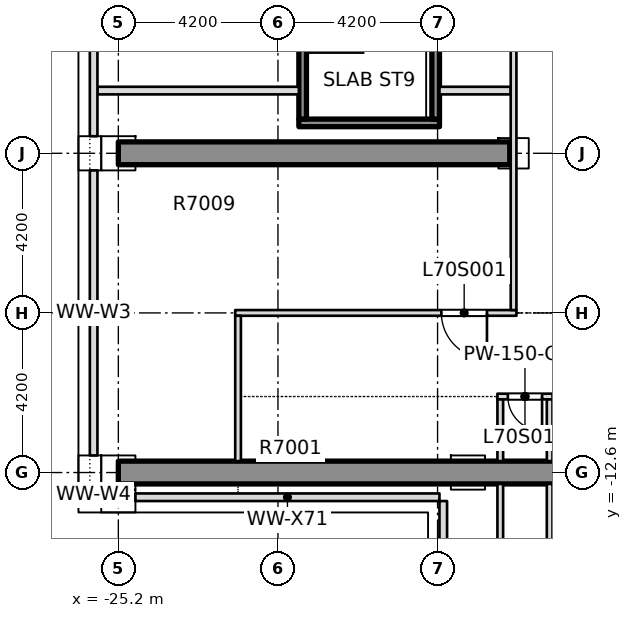
"""IFC4 building model, lengths in metres.
Left out: names, types, materials, properties, quantities, classifications, styles, units other than length and angle.
Written with IfcOpenShell. Run it as: python <this file> out.ifc"""

import sys

from ifc_helpers import new_model, si_unit, direction, frame, frame_2d, origin, place, context, subcontext, project, spatial, rectangle, extrude, element, fill, save


model = new_model("IFC4")
c1 = context("Model", 3, precision=1e-05, world=origin(), true_north=direction((0.0, 1.0)))
c2 = subcontext(c1, "Body", "Model", "MODEL_VIEW")
j1 = project(units=[si_unit("LENGTHUNIT", "METRE"), si_unit("PLANEANGLEUNIT", "RADIAN")], contexts=[c1])
p1 = place(None, origin())
s1 = spatial("IfcSite", under=j1, at=p1, CompositionType="ELEMENT")
p2 = place(p1, origin())
s2 = spatial("IfcBuilding", under=s1, at=p2, CompositionType="ELEMENT")
p3 = place(p2, frame((0.0, 0.0, 264.85)))
s3 = spatial("IfcBuildingStorey", under=s2, at=p3, CompositionType="ELEMENT", Elevation=264.85)
p4 = place(p3, frame((-8.55, -12.6, 0.0), z_axis=(0.0, 0.0, 1.0), x_axis=(-1.0, 0.0, 0.0)))
e1 = element("IfcWall", 1, at=p4, inside=s3, PredefinedType="SHEAR", context=c2, shape_type="SweptSolid", body=[
    extrude(rectangle(XDim=16.65, YDim=0.6, at=frame_2d((8.325, 0.0))), origin(), (0.0, 0.0, 1.0), 4.0),
])
p5 = place(p3, frame((-14.9, -4.2, 0.0), z_axis=(0.0, 0.0, 1.0), x_axis=(-1.0, 0.0, 0.0)))
e2 = element("IfcWall", 2, at=p5, inside=s3, PredefinedType="SHEAR", context=c2, shape_type="SweptSolid", body=[
    extrude(rectangle(XDim=10.3, YDim=0.6, at=frame_2d((5.15, 0.0))), origin(), (0.0, 0.0, 1.0), 4.0),
])
p6 = place(p3, frame((-15.225, -10.6, 0.0), z_axis=(0.0, 0.0, 1.0), x_axis=(1.0, 0.0, 0.0)))
e3 = element("IfcWall", 3, at=p6, inside=s3, PredefinedType="PARTITIONING", context=c2, shape_type="SweptSolid", body=[
    extrude(rectangle(XDim=1.45, YDim=0.15, at=frame_2d((0.725, 0.0))), origin(), (0.0, 0.0, 1.0), 4.0),
])
p7 = place(p6, frame((0.275, 0.0, 0.0)))
e4 = element("IfcOpeningElement", 4, at=p7, cuts=e3, PredefinedType="OPENING", context=c2, shape_type="SweptSolid", body=[
    extrude(rectangle(XDim=0.9, YDim=2.1, at=frame_2d((0.45, 1.05))), frame((0.0, 0.085, 0.0), z_axis=(0.0, -1.0, 0.0), x_axis=(1.0, 0.0, 0.0)), (0.0, 0.0, 1.0), 0.17),
])
p8 = place(p3, frame((-22.125, -8.4, 0.0), z_axis=(0.0, 0.0, 1.0), x_axis=(1.0, 0.0, 0.0)))
e5 = element("IfcWall", 5, at=p8, inside=s3, PredefinedType="PARTITIONING", context=c2, shape_type="SweptSolid", body=[
    extrude(rectangle(XDim=7.4, YDim=0.15, at=frame_2d((3.7, 0.0))), origin(), (0.0, 0.0, 1.0), 4.0),
])
p9 = place(p8, frame((5.425, 0.0, 0.0)))
e6 = element("IfcOpeningElement", 6, at=p9, cuts=e5, PredefinedType="OPENING", context=c2, shape_type="SweptSolid", body=[
    extrude(rectangle(XDim=1.2, YDim=2.1, at=frame_2d((0.6, 1.05))), frame((0.0, 0.085, 0.0), z_axis=(0.0, -1.0, 0.0), x_axis=(1.0, 0.0, 0.0)), (0.0, 0.0, 1.0), 0.17),
])
p10 = place(p3, frame((-25.75, -2.55, 0.0), z_axis=(0.0, 0.0, 1.0), x_axis=(1.0, 0.0, 0.0)))
e7 = element("IfcWall", 7, at=p10, inside=s3, PredefinedType="PARTITIONING", context=c2, shape_type="SweptSolid", body=[
    extrude(rectangle(XDim=5.3, YDim=0.2, at=frame_2d((2.65, 0.0))), origin(), (0.0, 0.0, 1.0), 4.0),
])
p11 = place(p3, frame((-16.75, -2.55, 0.0), z_axis=(0.0, 0.0, 1.0), x_axis=(1.0, 0.0, 0.0)))
e8 = element("IfcWall", 8, at=p11, inside=s3, PredefinedType="PARTITIONING", context=c2, shape_type="SweptSolid", body=[
    extrude(rectangle(XDim=1.875, YDim=0.2, at=frame_2d((0.938, 0.0))), origin(), (0.0, 0.0, 1.0), 4.0),
])
p12 = place(p3, frame((-22.05, -12.299, 0.0), z_axis=(0.0, 0.0, 1.0), x_axis=(0.0, 1.0, 0.0)))
e9 = element("IfcWall", 9, at=p12, inside=s3, PredefinedType="PARTITIONING", context=c2, shape_type="SweptSolid", body=[
    extrude(rectangle(XDim=3.824, YDim=0.15, at=frame_2d((1.912, 0.0))), origin(), (0.0, 0.0, 1.0), 4.0),
])
p13 = place(p3, frame((-15.15, -21.55, 0.0), z_axis=(0.0, 0.0, 1.0), x_axis=(0.0, 1.0, 0.0)))
e10 = element("IfcWall", 10, at=p13, inside=s3, PredefinedType="PARTITIONING", context=c2, shape_type="SweptSolid", body=[
    extrude(rectangle(XDim=8.649, YDim=0.15, at=frame_2d((4.325, 0.0))), origin(), (0.0, 0.0, 1.0), 4.0),
])
p14 = place(p3, frame((-15.15, -12.299, 0.0), z_axis=(0.0, 0.0, 1.0), x_axis=(0.0, 1.0, 0.0)))
e11 = element("IfcWall", 11, at=p14, inside=s3, PredefinedType="PARTITIONING", context=c2, shape_type="SweptSolid", body=[
    extrude(rectangle(XDim=1.624, YDim=0.15, at=frame_2d((0.812, 0.0))), origin(), (0.0, 0.0, 1.0), 4.0),
])
p15 = place(p3, frame((-14.8, -8.325, 0.0), z_axis=(0.0, 0.0, 1.0), x_axis=(0.0, 1.0, 0.0)))
e12 = element("IfcWall", 12, at=p15, inside=s3, PredefinedType="PARTITIONING", context=c2, shape_type="SweptSolid", body=[
    extrude(rectangle(XDim=29.875, YDim=0.15, at=frame_2d((14.938, 0.0))), origin(), (0.0, 0.0, 1.0), 4.0),
])
p16 = place(p15, frame((8.685, 0.0, 0.0)))
e13 = element("IfcOpeningElement", 13, at=p16, cuts=e12, PredefinedType="OPENING", context=c2, shape_type="SweptSolid", body=[
    extrude(rectangle(XDim=1.2, YDim=2.1, at=frame_2d((0.6, 1.05))), frame((0.0, 0.085, 0.0), z_axis=(0.0, -1.0, 0.0), x_axis=(1.0, 0.0, 0.0)), (0.0, 0.0, 1.0), 0.17),
])
p17 = place(p15, frame((15.435, 0.0, 0.0)))
e14 = element("IfcOpeningElement", 14, at=p17, cuts=e12, PredefinedType="OPENING", context=c2, shape_type="SweptSolid", body=[
    extrude(rectangle(XDim=1.2, YDim=2.1, at=frame_2d((0.6, 1.05))), frame((0.0, 0.085, 0.0), z_axis=(0.0, -1.0, 0.0), x_axis=(1.0, 0.0, 0.0)), (0.0, 0.0, 1.0), 0.17),
])
p18 = place(p15, frame((19.375, 0.0, 0.0)))
e15 = element("IfcOpeningElement", 15, at=p18, cuts=e12, PredefinedType="OPENING", context=c2, shape_type="SweptSolid", body=[
    extrude(rectangle(XDim=1.2, YDim=2.1, at=frame_2d((0.6, 1.05))), frame((0.0, 0.085, 0.0), z_axis=(0.0, -1.0, 0.0), x_axis=(1.0, 0.0, 0.0)), (0.0, 0.0, 1.0), 0.17),
])
p19 = place(p15, frame((25.425, 0.0, 0.0)))
e16 = element("IfcOpeningElement", 16, at=p19, cuts=e12, PredefinedType="OPENING", context=c2, shape_type="SweptSolid", body=[
    extrude(rectangle(XDim=0.7, YDim=2.1, at=frame_2d((0.35, 1.05))), frame((0.0, 0.085, 0.0), z_axis=(0.0, -1.0, 0.0), x_axis=(1.0, 0.0, 0.0)), (0.0, 0.0, 1.0), 0.17),
])
p20 = place(p3, frame((-13.85, -21.55, 0.0), z_axis=(0.0, 0.0, 1.0), x_axis=(0.0, 1.0, 0.0)))
e17 = element("IfcWall", 17, at=p20, inside=s3, PredefinedType="PARTITIONING", context=c2, shape_type="SweptSolid", body=[
    extrude(rectangle(XDim=8.649, YDim=0.15, at=frame_2d((4.325, 0.0))), origin(), (0.0, 0.0, 1.0), 4.0),
])
p21 = place(p3, frame((-13.85, -12.299, 0.0), z_axis=(0.0, 0.0, 1.0), x_axis=(0.0, 1.0, 0.0)))
e18 = element("IfcWall", 18, at=p21, inside=s3, PredefinedType="PARTITIONING", context=c2, shape_type="SweptSolid", body=[
    extrude(rectangle(XDim=1.624, YDim=0.15, at=frame_2d((0.812, 0.0))), origin(), (0.0, 0.0, 1.0), 4.0),
])
for number, where, z_axis, x_axis in (
    (19, (-25.85, 3.75, 0.0), (0.0, 0.0, 1.0), (0.0, -1.0, 0.0)),
    (20, (-25.85, -4.65, 0.0), (0.0, 0.0, 1.0), (0.0, -1.0, 0.0)),
):
    element("IfcWall", number, at=place(p3, frame(where, z_axis=z_axis, x_axis=x_axis)), inside=s3, PredefinedType="STANDARD", context=c2, shape_type="SweptSolid", body=[
        extrude(rectangle(XDim=7.5, YDim=0.2, at=frame_2d((3.75, 0.0))), origin(), (0.0, 0.0, 1.0), 4.0),
    ])
p22 = place(p3, frame((-25.85, -13.05, 0.0), z_axis=(0.0, 0.0, 1.0), x_axis=(0.0, -1.0, 0.0)))
e21 = element("IfcWall", 21, at=p22, inside=s3, PredefinedType="STANDARD", context=c2, shape_type="SweptSolid", body=[
    extrude(rectangle(XDim=0.3, YDim=0.2, at=frame_2d((0.15, 0.0))), origin(), (0.0, 0.0, 1.0), 4.0),
])
p23 = place(p3, frame((-24.75, -13.25, 0.0), z_axis=(0.0, 0.0, 1.0), x_axis=(1.0, 0.0, 0.0)))
e22 = element("IfcWall", 22, at=p23, inside=s3, PredefinedType="STANDARD", context=c2, shape_type="SweptSolid", body=[
    extrude(rectangle(XDim=8.0, YDim=0.2, at=frame_2d((4.0, 0.0))), origin(), (0.0, 0.0, 1.0), 4.0),
])
p24 = place(p3, frame((-16.65, -13.35, 0.0), z_axis=(0.0, 0.0, 1.0), x_axis=(0.0, -1.0, 0.0)))
e23 = element("IfcWall", 23, at=p24, inside=s3, PredefinedType="STANDARD", context=c2, shape_type="SweptSolid", body=[
    extrude(rectangle(XDim=7.2, YDim=0.2, at=frame_2d((3.6, 0.0))), origin(), (0.0, 0.0, 1.0), 4.0),
])
p25 = place(p3, frame((-20.45, -3.4, 0.0), z_axis=(0.0, 0.0, 1.0), x_axis=(1.0, 0.0, 0.0)))
e24 = element("IfcWall", 24, at=p25, inside=s3, PredefinedType="SOLIDWALL", context=c2, shape_type="SweptSolid", body=[
    extrude(rectangle(XDim=3.7, YDim=0.2, at=frame_2d((1.85, 0.0))), origin(), (0.0, 0.0, 1.0), 4.0),
])
for number, where, z_axis, x_axis in (
    (25, (-20.35, -3.3, 0.0), (0.0, 0.0, 1.0), (0.0, 1.0, 0.0)),
    (26, (-16.85, -3.3, 0.0), (0.0, 0.0, 1.0), (0.0, 1.0, 0.0)),
):
    element("IfcWall", number, at=place(p3, frame(where, z_axis=z_axis, x_axis=x_axis)), inside=s3, PredefinedType="SOLIDWALL", context=c2, shape_type="SweptSolid", body=[
        extrude(rectangle(XDim=6.6, YDim=0.2, at=frame_2d((3.3, 0.0))), origin(), (0.0, 0.0, 1.0), 4.0),
    ])
p26 = place(p9, origin())
e27 = element("IfcDoor", 27, at=p26, inside=s3, OperationType="SINGLE_SWING_RIGHT", PredefinedType="DOOR", context=c2, shape_type="SweptSolid", body=[
    extrude(rectangle(XDim=1.2, YDim=2.1, at=frame_2d((0.6, 1.05))), frame((0.0, 0.025, 0.0), z_axis=(0.0, -1.0, 0.0), x_axis=(1.0, 0.0, 0.0)), (0.0, 0.0, 1.0), 0.05),
])
fill(e6, e27)
p27 = place(p7, origin())
e28 = element("IfcDoor", 28, at=p27, inside=s3, OperationType="SINGLE_SWING_RIGHT", PredefinedType="DOOR", context=c2, shape_type="SweptSolid", body=[
    extrude(rectangle(XDim=0.9, YDim=2.1, at=frame_2d((0.45, 1.05))), frame((0.0, 0.025, 0.0), z_axis=(0.0, -1.0, 0.0), x_axis=(1.0, 0.0, 0.0)), (0.0, 0.0, 1.0), 0.05),
])
fill(e4, e28)
save(model, sys.argv[1])
